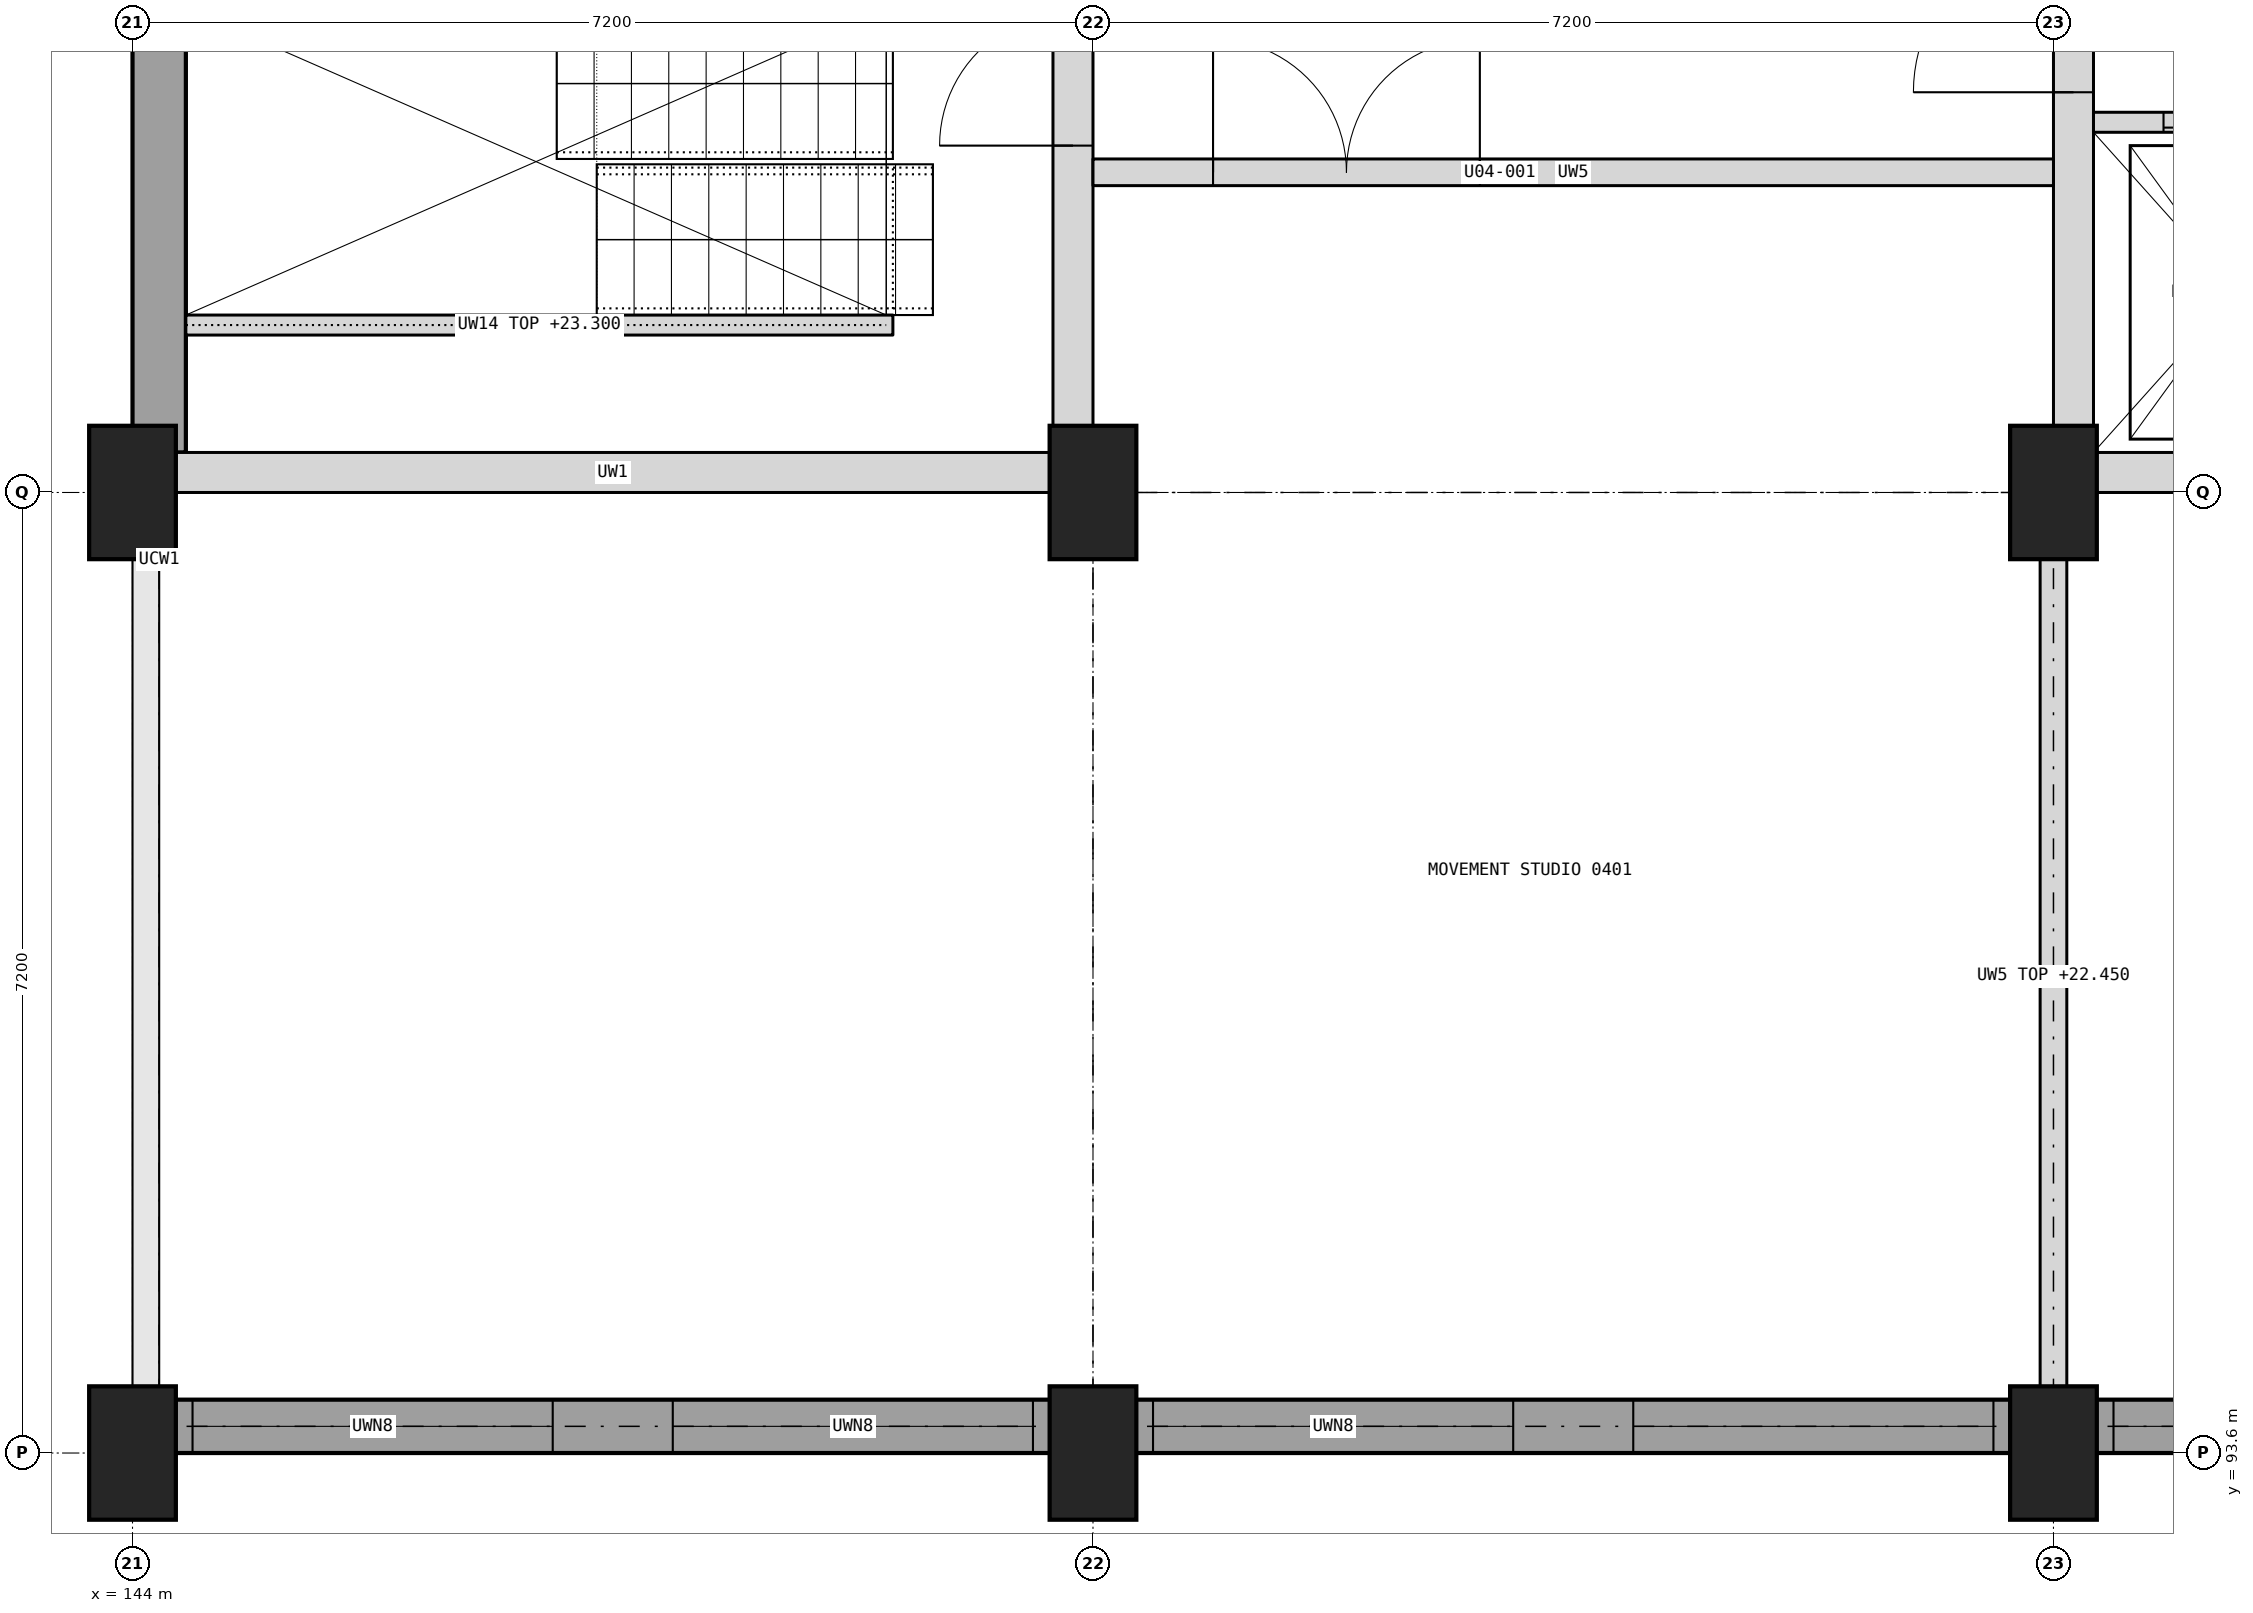
"""IFC4 building model, lengths in metres.
Left out: names, types, materials, properties, quantities, classifications, styles, units other than length and angle.
Written with IfcOpenShell. Run it as: python <this file> out.ifc"""

import sys

from ifc_helpers import new_model, si_unit, direction, frame, frame_2d, origin, origin_2d, place, context, subcontext, project, spatial, rectangle, extrude, element, fill, save


model = new_model("IFC4")
c1 = context("Model", 3, precision=1e-05, world=origin(), true_north=direction((0.0, 1.0)))
c2 = subcontext(c1, "Body", "Model", "MODEL_VIEW")
j1 = project(units=[si_unit("LENGTHUNIT", "METRE"), si_unit("PLANEANGLEUNIT", "RADIAN")], contexts=[c1])
p1 = place(None, origin())
s1 = spatial("IfcSite", under=j1, at=p1, CompositionType="ELEMENT")
p2 = place(p1, origin())
s2 = spatial("IfcBuilding", under=s1, at=p2, CompositionType="ELEMENT")
p3 = place(p2, frame((0.0, 0.0, 19.9)))
s3 = spatial("IfcBuildingStorey", under=s2, at=p3, CompositionType="ELEMENT", Elevation=19.9)
for number, where, z_axis, x_axis in (
    (1, (144.0, 93.6, 0.0), (0.0, 0.0, 1.0), (1.0, 0.0, 0.0)),
    (2, (144.0, 100.8, 0.0), (0.0, 0.0, 1.0), (1.0, 0.0, 0.0)),
    (3, (151.2, 93.6, 0.0), (0.0, 0.0, 1.0), (1.0, 0.0, 0.0)),
    (4, (151.2, 100.8, 0.0), (0.0, 0.0, 1.0), (1.0, 0.0, 0.0)),
    (5, (158.4, 93.6, 0.0), (0.0, 0.0, 1.0), (1.0, 0.0, 0.0)),
    (6, (158.4, 100.8, 0.0), (0.0, 0.0, 1.0), (1.0, 0.0, 0.0)),
):
    element("IfcColumn", number, at=place(p3, frame(where, z_axis=z_axis, x_axis=x_axis)), inside=s3, PredefinedType="COLUMN", context=c2, shape_type="SweptSolid", body=[
        extrude(rectangle(XDim=0.65, YDim=1.0, at=origin_2d()), origin(), (0.0, 0.0, 1.0), 3.4),
    ])
p4 = place(p3, frame((158.4, 100.95, 0.0), z_axis=(0.0, 0.0, 1.0), x_axis=(1.0, 0.0, 0.0)))
e7 = element("IfcWall", 7, at=p4, inside=s3, PredefinedType="SHEAR", context=c2, shape_type="SweptSolid", body=[
    extrude(rectangle(XDim=14.4, YDim=0.3, at=frame_2d((7.2, 0.0))), origin(), (0.0, 0.0, 1.0), 3.4),
])
p5 = place(p3, frame((158.55, 101.1, 0.0), z_axis=(0.0, 0.0, 1.0), x_axis=(0.0, 1.0, 0.0)))
e8 = element("IfcWall", 8, at=p5, inside=s3, PredefinedType="SHEAR", context=c2, shape_type="SweptSolid", body=[
    extrude(rectangle(XDim=6.6, YDim=0.3, at=frame_2d((3.3, 0.0))), origin(), (0.0, 0.0, 1.0), 3.4),
])
p6 = place(p5, frame((2.7, 0.0, 0.0)))
e9 = element("IfcOpeningElement", 9, at=p6, cuts=e8, PredefinedType="OPENING", context=c2, shape_type="SweptSolid", body=[
    extrude(rectangle(XDim=1.2, YDim=2.1, at=frame_2d((0.6, 1.05))), frame((0.0, 0.16, 0.0), z_axis=(0.0, -1.0, 0.0), x_axis=(1.0, 0.0, 0.0)), (0.0, 0.0, 1.0), 0.32),
])
p7 = place(p3, frame((158.7, 103.575, 0.0), z_axis=(0.0, 0.0, 1.0), x_axis=(1.0, 0.0, 0.0)))
e10 = element("IfcWall", 10, at=p7, inside=s3, PredefinedType="PARTITIONING", context=c2, shape_type="SweptSolid", body=[
    extrude(rectangle(XDim=6.75, YDim=0.15, at=frame_2d((3.375, 0.0))), origin(), (0.0, 0.0, 1.0), 3.4),
])
p8 = place(p7, frame((0.525, 0.0, 0.0)))
e11 = element("IfcOpeningElement", 11, at=p8, cuts=e10, PredefinedType="OPENING", context=c2, shape_type="SweptSolid", body=[
    extrude(rectangle(XDim=1.1, YDim=2.1, at=frame_2d((0.55, 1.05))), frame((0.0, 0.085, 0.0), z_axis=(0.0, -1.0, 0.0), x_axis=(1.0, 0.0, 0.0)), (0.0, 0.0, 1.0), 0.17),
])
p9 = place(p7, frame((2.825, 0.0, 0.0)))
e12 = element("IfcOpeningElement", 12, at=p9, cuts=e10, PredefinedType="OPENING", context=c2, shape_type="SweptSolid", body=[
    extrude(rectangle(XDim=1.1, YDim=2.1, at=frame_2d((0.55, 1.05))), frame((0.0, 0.085, 0.0), z_axis=(0.0, -1.0, 0.0), x_axis=(1.0, 0.0, 0.0)), (0.0, 0.0, 1.0), 0.17),
])
p10 = place(p7, frame((5.125, 0.0, 0.0)))
e13 = element("IfcOpeningElement", 13, at=p10, cuts=e10, PredefinedType="OPENING", context=c2, shape_type="SweptSolid", body=[
    extrude(rectangle(XDim=1.1, YDim=2.1, at=frame_2d((0.55, 1.05))), frame((0.0, 0.085, 0.0), z_axis=(0.0, -1.0, 0.0), x_axis=(1.0, 0.0, 0.0)), (0.0, 0.0, 1.0), 0.17),
])
p11 = place(p3, frame((144.0, 100.95, 0.0), z_axis=(0.0, 0.0, 1.0), x_axis=(1.0, 0.0, 0.0)))
e14 = element("IfcWall", 14, at=p11, inside=s3, PredefinedType="SHEAR", context=c2, shape_type="SweptSolid", body=[
    extrude(rectangle(XDim=7.2, YDim=0.3, at=frame_2d((3.6, 0.0))), origin(), (0.0, 0.0, 1.0), 3.4),
])
p12 = place(p3, frame((151.05, 101.1, 0.0), z_axis=(0.0, 0.0, 1.0), x_axis=(0.0, 1.0, 0.0)))
e15 = element("IfcWall", 15, at=p12, inside=s3, PredefinedType="SHEAR", context=c2, shape_type="SweptSolid", body=[
    extrude(rectangle(XDim=6.6, YDim=0.3, at=frame_2d((3.3, 0.0))), origin(), (0.0, 0.0, 1.0), 3.4),
])
p13 = place(p12, frame((2.3, 0.0, 0.0)))
e16 = element("IfcOpeningElement", 16, at=p13, cuts=e15, PredefinedType="OPENING", context=c2, shape_type="SweptSolid", body=[
    extrude(rectangle(XDim=1.0, YDim=2.1, at=frame_2d((0.5, 1.05))), frame((0.0, 0.16, 0.0), z_axis=(0.0, -1.0, 0.0), x_axis=(1.0, 0.0, 0.0)), (0.0, 0.0, 1.0), 0.32),
])
p14 = place(p3, frame((144.2, 101.1, 0.0), z_axis=(0.0, 0.0, 1.0), x_axis=(0.0, 1.0, 0.0)))
e17 = element("IfcWall", 17, at=p14, inside=s3, PredefinedType="SHEAR", context=c2, shape_type="SweptSolid", body=[
    extrude(rectangle(XDim=6.6, YDim=0.4, at=frame_2d((3.3, 0.0))), origin(), (0.0, 0.0, 1.0), 3.4),
])
p15 = place(p14, frame((4.4, 0.0, 1.0)))
e18 = element("IfcOpeningElement", 18, at=p15, cuts=e17, PredefinedType="OPENING", context=c2, shape_type="SweptSolid", body=[
    extrude(rectangle(XDim=1.0, YDim=1.5, at=frame_2d((0.5, 0.75))), frame((0.0, 0.21, 0.0), z_axis=(0.0, -1.0, 0.0), x_axis=(1.0, 0.0, 0.0)), (0.0, 0.0, 1.0), 0.42),
])
p16 = place(p3, frame((144.4, 102.055, 0.0), z_axis=(0.0, 0.0, 1.0), x_axis=(1.0, 0.0, 0.0)))
e19 = element("IfcWall", 19, at=p16, inside=s3, PredefinedType="SHEAR", context=c2, shape_type="SweptSolid", body=[
    extrude(rectangle(XDim=5.3, YDim=0.15, at=frame_2d((2.65, 0.0))), origin(), (0.0, 0.0, 1.0), 3.4),
])
p17 = place(p3, frame((144.0, 93.8, 0.0), z_axis=(0.0, 0.0, 1.0), x_axis=(1.0, 0.0, 0.0)))
e20 = element("IfcWall", 20, at=p17, inside=s3, PredefinedType="SOLIDWALL", context=c2, shape_type="SweptSolid", body=[
    extrude(rectangle(XDim=7.2, YDim=0.4, at=frame_2d((3.6, 0.0))), origin(), (0.0, 0.0, 1.0), 2.6),
])
p18 = place(p17, frame((0.45, 0.0, 0.9)))
e21 = element("IfcOpeningElement", 21, at=p18, cuts=e20, PredefinedType="OPENING", context=c2, shape_type="SweptSolid", body=[
    extrude(rectangle(XDim=2.7, YDim=1.5, at=frame_2d((1.35, 0.75))), frame((0.0, 0.21, 0.0), z_axis=(0.0, -1.0, 0.0), x_axis=(1.0, 0.0, 0.0)), (0.0, 0.0, 1.0), 0.42),
])
p19 = place(p17, frame((4.05, 0.0, 0.9)))
e22 = element("IfcOpeningElement", 22, at=p19, cuts=e20, PredefinedType="OPENING", context=c2, shape_type="SweptSolid", body=[
    extrude(rectangle(XDim=2.7, YDim=1.5, at=frame_2d((1.35, 0.75))), frame((0.0, 0.21, 0.0), z_axis=(0.0, -1.0, 0.0), x_axis=(1.0, 0.0, 0.0)), (0.0, 0.0, 1.0), 0.42),
])
p20 = place(p3, frame((151.2, 93.8, 0.0), z_axis=(0.0, 0.0, 1.0), x_axis=(1.0, 0.0, 0.0)))
e23 = element("IfcWall", 23, at=p20, inside=s3, PredefinedType="SOLIDWALL", context=c2, shape_type="SweptSolid", body=[
    extrude(rectangle(XDim=7.2, YDim=0.4, at=frame_2d((3.6, 0.0))), origin(), (0.0, 0.0, 1.0), 2.6),
])
p21 = place(p20, frame((0.45, 0.0, 0.9)))
e24 = element("IfcOpeningElement", 24, at=p21, cuts=e23, PredefinedType="OPENING", context=c2, shape_type="SweptSolid", body=[
    extrude(rectangle(XDim=2.7, YDim=1.5, at=frame_2d((1.35, 0.75))), frame((0.0, 0.21, 0.0), z_axis=(0.0, -1.0, 0.0), x_axis=(1.0, 0.0, 0.0)), (0.0, 0.0, 1.0), 0.42),
])
p22 = place(p20, frame((4.05, 0.0, 0.9)))
e25 = element("IfcOpeningElement", 25, at=p22, cuts=e23, PredefinedType="OPENING", context=c2, shape_type="SweptSolid", body=[
    extrude(rectangle(XDim=2.7, YDim=1.5, at=frame_2d((1.35, 0.75))), frame((0.0, 0.21, 0.0), z_axis=(0.0, -1.0, 0.0), x_axis=(1.0, 0.0, 0.0)), (0.0, 0.0, 1.0), 0.42),
])
p23 = place(p3, frame((158.4, 93.8, 0.0), z_axis=(0.0, 0.0, 1.0), x_axis=(1.0, 0.0, 0.0)))
e26 = element("IfcWall", 26, at=p23, inside=s3, PredefinedType="SOLIDWALL", context=c2, shape_type="SweptSolid", body=[
    extrude(rectangle(XDim=7.2, YDim=0.4, at=frame_2d((3.6, 0.0))), origin(), (0.0, 0.0, 1.0), 2.6),
])
p24 = place(p23, frame((0.45, 0.0, 0.9)))
e27 = element("IfcOpeningElement", 27, at=p24, cuts=e26, PredefinedType="OPENING", context=c2, shape_type="SweptSolid", body=[
    extrude(rectangle(XDim=2.7, YDim=1.5, at=frame_2d((1.35, 0.75))), frame((0.0, 0.21, 0.0), z_axis=(0.0, -1.0, 0.0), x_axis=(1.0, 0.0, 0.0)), (0.0, 0.0, 1.0), 0.42),
])
p25 = place(p23, frame((4.05, 0.0, 0.9)))
e28 = element("IfcOpeningElement", 28, at=p25, cuts=e26, PredefinedType="OPENING", context=c2, shape_type="SweptSolid", body=[
    extrude(rectangle(XDim=2.7, YDim=1.5, at=frame_2d((1.35, 0.75))), frame((0.0, 0.21, 0.0), z_axis=(0.0, -1.0, 0.0), x_axis=(1.0, 0.0, 0.0)), (0.0, 0.0, 1.0), 0.42),
])
p26 = place(p3, frame((151.2, 103.2, 0.0), z_axis=(0.0, 0.0, 1.0), x_axis=(1.0, 0.0, 0.0)))
e29 = element("IfcWall", 29, at=p26, inside=s3, PredefinedType="PARTITIONING", context=c2, shape_type="SweptSolid", body=[
    extrude(rectangle(XDim=7.2, YDim=0.2, at=frame_2d((3.6, 0.0))), origin(), (0.0, 0.0, 1.0), 3.1),
])
p27 = place(p26, frame((0.9, 0.0, 0.0)))
e30 = element("IfcOpeningElement", 30, at=p27, cuts=e29, PredefinedType="OPENING", context=c2, shape_type="SweptSolid", body=[
    extrude(rectangle(XDim=2.0, YDim=2.1, at=frame_2d((1.0, 1.05))), frame((0.0, 0.11, 0.0), z_axis=(0.0, -1.0, 0.0), x_axis=(1.0, 0.0, 0.0)), (0.0, 0.0, 1.0), 0.22),
])
p28 = place(p3, frame((158.4, 94.0, 0.0), z_axis=(0.0, 0.0, 1.0), x_axis=(0.0, 1.0, 0.0)))
e31 = element("IfcWall", 31, at=p28, inside=s3, PredefinedType="PARTITIONING", context=c2, shape_type="SweptSolid", body=[
    extrude(rectangle(XDim=6.35, YDim=0.2, at=frame_2d((3.175, 0.0))), origin(), (0.0, 0.0, 1.0), 2.55),
])
p29 = place(p18, origin())
e32 = element("IfcWindow", 32, at=p29, inside=s3, PartitioningType="TRIPLE_PANEL_VERTICAL", PredefinedType="WINDOW", context=c2, shape_type="SweptSolid", body=[
    extrude(rectangle(XDim=2.7, YDim=1.5, at=frame_2d((1.35, 0.75))), frame((0.0, 0.03, 0.0), z_axis=(0.0, -1.0, 0.0), x_axis=(1.0, 0.0, 0.0)), (0.0, 0.0, 1.0), 0.06),
])
fill(e21, e32)
p30 = place(p19, origin())
e33 = element("IfcWindow", 33, at=p30, inside=s3, PartitioningType="TRIPLE_PANEL_VERTICAL", PredefinedType="WINDOW", context=c2, shape_type="SweptSolid", body=[
    extrude(rectangle(XDim=2.7, YDim=1.5, at=frame_2d((1.35, 0.75))), frame((0.0, 0.03, 0.0), z_axis=(0.0, -1.0, 0.0), x_axis=(1.0, 0.0, 0.0)), (0.0, 0.0, 1.0), 0.06),
])
fill(e22, e33)
p31 = place(p21, origin())
e34 = element("IfcWindow", 34, at=p31, inside=s3, PartitioningType="TRIPLE_PANEL_VERTICAL", PredefinedType="WINDOW", context=c2, shape_type="SweptSolid", body=[
    extrude(rectangle(XDim=2.7, YDim=1.5, at=frame_2d((1.35, 0.75))), frame((0.0, 0.03, 0.0), z_axis=(0.0, -1.0, 0.0), x_axis=(1.0, 0.0, 0.0)), (0.0, 0.0, 1.0), 0.06),
])
fill(e24, e34)
p32 = place(p22, origin())
e35 = element("IfcWindow", 35, at=p32, inside=s3, PartitioningType="TRIPLE_PANEL_VERTICAL", PredefinedType="WINDOW", context=c2, shape_type="SweptSolid", body=[
    extrude(rectangle(XDim=2.7, YDim=1.5, at=frame_2d((1.35, 0.75))), frame((0.0, 0.03, 0.0), z_axis=(0.0, -1.0, 0.0), x_axis=(1.0, 0.0, 0.0)), (0.0, 0.0, 1.0), 0.06),
])
fill(e25, e35)
p33 = place(p24, origin())
e36 = element("IfcWindow", 36, at=p33, inside=s3, PartitioningType="TRIPLE_PANEL_VERTICAL", PredefinedType="WINDOW", context=c2, shape_type="SweptSolid", body=[
    extrude(rectangle(XDim=2.7, YDim=1.5, at=frame_2d((1.35, 0.75))), frame((0.0, 0.03, 0.0), z_axis=(0.0, -1.0, 0.0), x_axis=(1.0, 0.0, 0.0)), (0.0, 0.0, 1.0), 0.06),
])
fill(e27, e36)
p34 = place(p27, origin())
e37 = element("IfcDoor", 37, at=p34, inside=s3, OperationType="DOUBLE_DOOR_SINGLE_SWING", PredefinedType="DOOR", context=c2, shape_type="SweptSolid", body=[
    extrude(rectangle(XDim=2.0, YDim=2.1, at=frame_2d((1.0, 1.05))), frame((0.0, 0.025, 0.0), z_axis=(0.0, -1.0, 0.0), x_axis=(1.0, 0.0, 0.0)), (0.0, 0.0, 1.0), 0.05),
])
fill(e30, e37)
p35 = place(p8, origin())
e38 = element("IfcDoor", 38, at=p35, inside=s3, OperationType="DOUBLE_DOOR_SLIDING", PredefinedType="DOOR", context=c2, shape_type="SweptSolid", body=[
    extrude(rectangle(XDim=1.1, YDim=2.1, at=frame_2d((0.55, 1.05))), frame((0.0, 0.025, 0.0), z_axis=(0.0, -1.0, 0.0), x_axis=(1.0, 0.0, 0.0)), (0.0, 0.0, 1.0), 0.05),
])
fill(e11, e38)
p36 = place(p6, origin())
e39 = element("IfcDoor", 39, at=p36, inside=s3, OperationType="SINGLE_SWING_LEFT", PredefinedType="DOOR", context=c2, shape_type="SweptSolid", body=[
    extrude(rectangle(XDim=1.2, YDim=2.1, at=frame_2d((0.6, 1.05))), frame((0.0, 0.025, 0.0), z_axis=(0.0, -1.0, 0.0), x_axis=(1.0, 0.0, 0.0)), (0.0, 0.0, 1.0), 0.05),
])
fill(e9, e39)
p37 = place(p13, origin())
e40 = element("IfcDoor", 40, at=p37, inside=s3, OperationType="SINGLE_SWING_LEFT", PredefinedType="DOOR", context=c2, shape_type="SweptSolid", body=[
    extrude(rectangle(XDim=1.0, YDim=2.1, at=frame_2d((0.5, 1.05))), frame((0.0, 0.025, 0.0), z_axis=(0.0, -1.0, 0.0), x_axis=(1.0, 0.0, 0.0)), (0.0, 0.0, 1.0), 0.05),
])
fill(e16, e40)
save(model, sys.argv[1])
